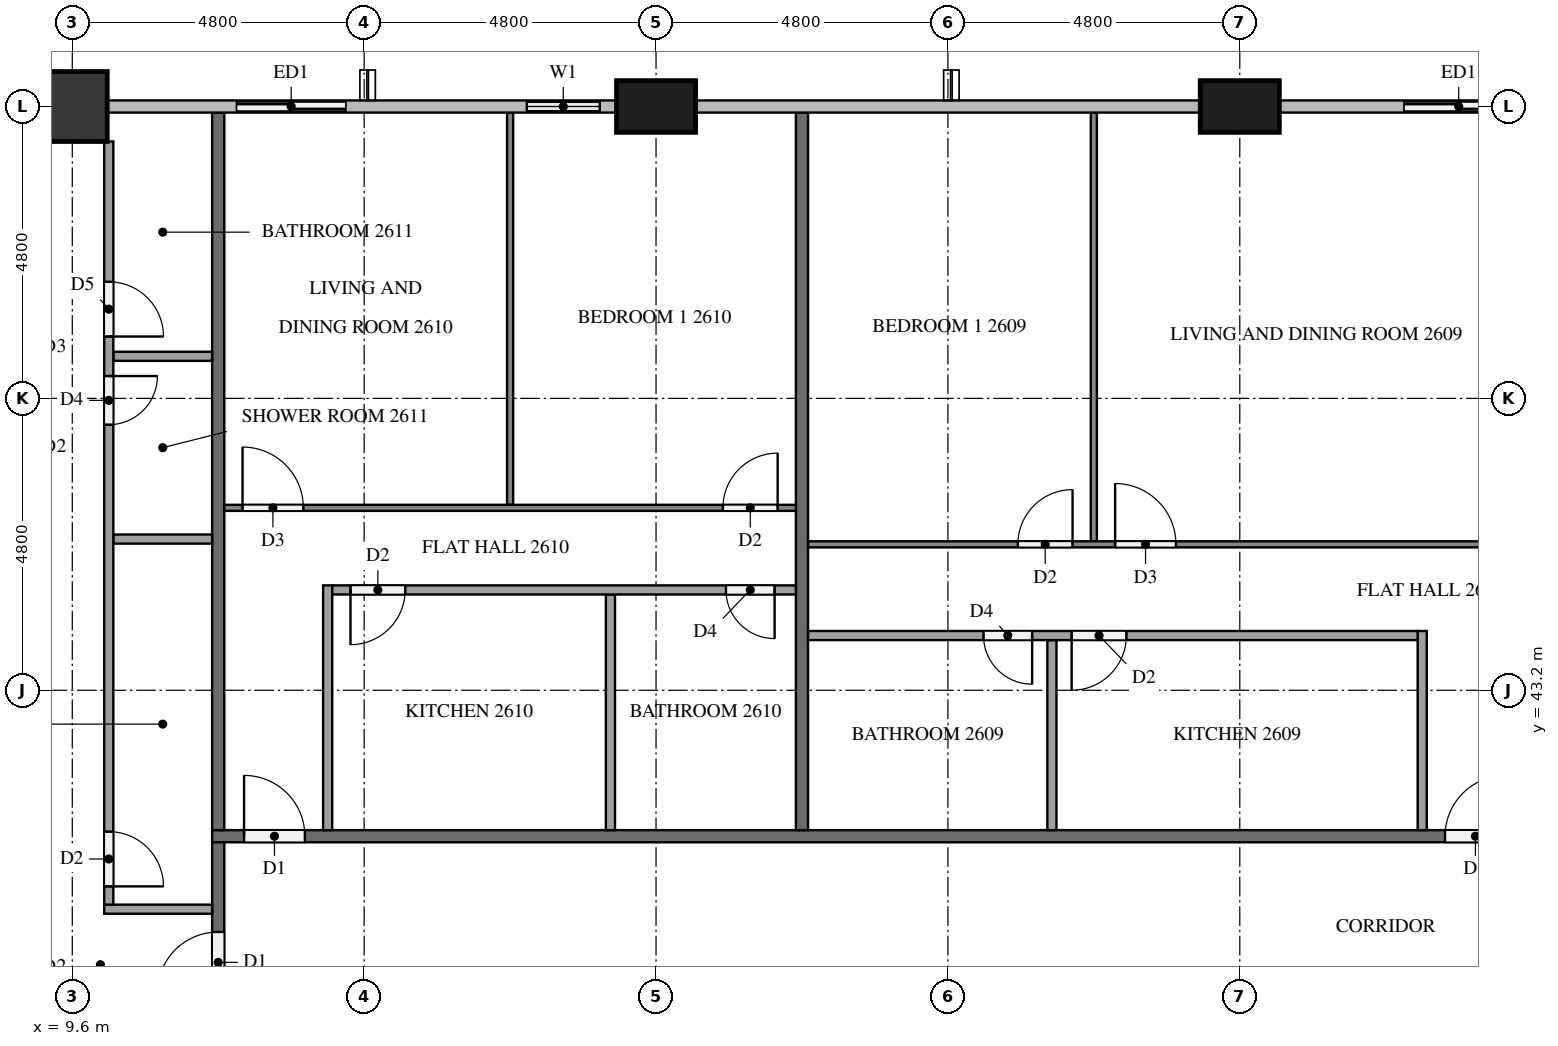
"""IFC4 building model, lengths in metres.
Left out: names, types, materials, properties, quantities, classifications, styles, units other than length and angle.
Written with IfcOpenShell. Run it as: python <this file> out.ifc"""

import sys

from ifc_helpers import new_model, si_unit, direction, frame, frame_2d, origin, origin_2d, place, context, subcontext, project, spatial, rectangle, extrude, element, fill, save


model = new_model("IFC4")
c1 = context("Model", 3, precision=1e-05, world=origin(), true_north=direction((0.0, 1.0)))
c2 = subcontext(c1, "Body", "Model", "MODEL_VIEW")
j1 = project(units=[si_unit("LENGTHUNIT", "METRE"), si_unit("PLANEANGLEUNIT", "RADIAN")], contexts=[c1])
p1 = place(None, origin())
s1 = spatial("IfcSite", under=j1, at=p1, CompositionType="ELEMENT")
p2 = place(p1, origin())
s2 = spatial("IfcBuilding", under=s1, at=p2, CompositionType="ELEMENT")
p3 = place(p2, frame((0.0, 0.0, 103.2)))
s3 = spatial("IfcBuildingStorey", under=s2, at=p3, CompositionType="ELEMENT", Elevation=103.2)
for number, where, z_axis, x_axis in (
    (1, (28.8, 52.8, 0.0), (0.0, 0.0, 1.0), (1.0, 0.0, 0.0)),
    (2, (19.2, 52.8, 0.0), (0.0, 0.0, 1.0), (1.0, 0.0, 0.0)),
):
    element("IfcColumn", number, at=place(p3, frame(where, z_axis=z_axis, x_axis=x_axis)), inside=s3, PredefinedType="COLUMN", context=c2, shape_type="SweptSolid", body=[
        extrude(rectangle(XDim=1.3, YDim=0.85, at=origin_2d()), origin(), (0.0, 0.0, 1.0), 3.2),
    ])
p4 = place(p3, frame((9.6, 52.8, 0.0), z_axis=(0.0, 0.0, 1.0), x_axis=(1.0, 0.0, 0.0)))
e3 = element("IfcColumn", 3, at=p4, inside=s3, PredefinedType="COLUMN", context=c2, shape_type="SweptSolid", body=[
    extrude(rectangle(XDim=1.15, YDim=1.15, at=origin_2d()), origin(), (0.0, 0.0, 1.0), 3.2),
])
p5 = place(p3, frame((33.6, 52.8, 0.0), z_axis=(0.0, 0.0, 1.0), x_axis=(-1.0, 0.0, 0.0)))
e4 = element("IfcWall", 4, at=p5, inside=s3, PredefinedType="SOLIDWALL", context=c2, shape_type="SweptSolid", body=[
    extrude(rectangle(XDim=2.4, YDim=0.15, at=frame_2d((1.2, 0.0))), origin(), (0.0, 0.0, 1.0), 3.2),
])
p6 = place(p5, frame((0.3, 0.0, 0.0)))
e5 = element("IfcOpeningElement", 5, at=p6, cuts=e4, PredefinedType="OPENING", context=c2, shape_type="SweptSolid", body=[
    extrude(rectangle(XDim=1.8, YDim=2.4, at=frame_2d((0.9, 1.2))), frame((0.0, 0.085, 0.0), z_axis=(0.0, -1.0, 0.0), x_axis=(1.0, 0.0, 0.0)), (0.0, 0.0, 1.0), 0.17),
])
p7 = place(p3, frame((18.55, 52.8, 0.0), z_axis=(0.0, 0.0, 1.0), x_axis=(-1.0, 0.0, 0.0)))
e6 = element("IfcWall", 6, at=p7, inside=s3, PredefinedType="SOLIDWALL", context=c2, shape_type="SweptSolid", body=[
    extrude(rectangle(XDim=1.75, YDim=0.15, at=frame_2d((0.875, 0.0))), origin(), (0.0, 0.0, 1.0), 3.2),
])
p8 = place(p7, frame((0.275, 0.0, 0.9)))
e7 = element("IfcOpeningElement", 7, at=p8, cuts=e6, PredefinedType="OPENING", context=c2, shape_type="SweptSolid", body=[
    extrude(rectangle(XDim=1.2, YDim=1.4, at=frame_2d((0.6, 0.7))), frame((0.0, 0.085, 0.0), z_axis=(0.0, -1.0, 0.0), x_axis=(1.0, 0.0, 0.0)), (0.0, 0.0, 1.0), 0.17),
])
p9 = place(p3, frame((14.4, 52.8, 0.0), z_axis=(0.0, 0.0, 1.0), x_axis=(-1.0, 0.0, 0.0)))
e8 = element("IfcWall", 8, at=p9, inside=s3, PredefinedType="SOLIDWALL", context=c2, shape_type="SweptSolid", body=[
    extrude(rectangle(XDim=2.4, YDim=0.15, at=frame_2d((1.2, 0.0))), origin(), (0.0, 0.0, 1.0), 3.2),
])
p10 = place(p9, frame((0.3, 0.0, 0.0)))
e9 = element("IfcOpeningElement", 9, at=p10, cuts=e8, PredefinedType="OPENING", context=c2, shape_type="SweptSolid", body=[
    extrude(rectangle(XDim=1.8, YDim=2.4, at=frame_2d((0.9, 1.2))), frame((0.0, 0.085, 0.0), z_axis=(0.0, -1.0, 0.0), x_axis=(1.0, 0.0, 0.0)), (0.0, 0.0, 1.0), 0.17),
])
p11 = place(p3, frame((11.9, 40.8, 0.0), z_axis=(0.0, 0.0, 1.0), x_axis=(1.0, 0.0, 0.0)))
e10 = element("IfcWall", 10, at=p11, inside=s3, PredefinedType="PARTITIONING", context=c2, shape_type="SweptSolid", body=[
    extrude(rectangle(XDim=38.6, YDim=0.2, at=frame_2d((19.3, 0.0))), origin(), (0.0, 0.0, 1.0), 3.2),
])
p12 = place(p11, frame((22.125, 0.0, 0.0)))
e11 = element("IfcOpeningElement", 11, at=p12, cuts=e10, PredefinedType="OPENING", context=c2, shape_type="SweptSolid", body=[
    extrude(rectangle(XDim=1.0, YDim=2.1, at=frame_2d((0.5, 1.05))), frame((0.0, 0.11, 0.0), z_axis=(0.0, -1.0, 0.0), x_axis=(1.0, 0.0, 0.0)), (0.0, 0.0, 1.0), 0.22),
])
p13 = place(p11, frame((20.275, 0.0, 0.0)))
e12 = element("IfcOpeningElement", 12, at=p13, cuts=e10, PredefinedType="OPENING", context=c2, shape_type="SweptSolid", body=[
    extrude(rectangle(XDim=1.0, YDim=2.1, at=frame_2d((0.5, 1.05))), frame((0.0, 0.11, 0.0), z_axis=(0.0, -1.0, 0.0), x_axis=(1.0, 0.0, 0.0)), (0.0, 0.0, 1.0), 0.22),
])
p14 = place(p11, frame((0.525, 0.0, 0.0)))
e13 = element("IfcOpeningElement", 13, at=p14, cuts=e10, PredefinedType="OPENING", context=c2, shape_type="SweptSolid", body=[
    extrude(rectangle(XDim=1.0, YDim=2.1, at=frame_2d((0.5, 1.05))), frame((0.0, 0.11, 0.0), z_axis=(0.0, -1.0, 0.0), x_axis=(1.0, 0.0, 0.0)), (0.0, 0.0, 1.0), 0.22),
])
p15 = place(p3, frame((12.0, 37.9, 0.0), z_axis=(0.0, 0.0, 1.0), x_axis=(0.0, 1.0, 0.0)))
e14 = element("IfcWall", 14, at=p15, inside=s3, PredefinedType="PARTITIONING", context=c2, shape_type="SweptSolid", body=[
    extrude(rectangle(XDim=2.8, YDim=0.2, at=frame_2d((1.4, 0.0))), origin(), (0.0, 0.0, 1.0), 3.2),
])
p16 = place(p15, frame((0.325, 0.0, 0.0)))
e15 = element("IfcOpeningElement", 15, at=p16, cuts=e14, PredefinedType="OPENING", context=c2, shape_type="SweptSolid", body=[
    extrude(rectangle(XDim=1.0, YDim=2.1, at=frame_2d((0.5, 1.05))), frame((0.0, 0.11, 0.0), z_axis=(0.0, -1.0, 0.0), x_axis=(1.0, 0.0, 0.0)), (0.0, 0.0, 1.0), 0.22),
])
for number, where, z_axis, x_axis in (
    (16, (21.6, 52.7, 0.0), (0.0, 0.0, 1.0), (0.0, -1.0, 0.0)),
    (17, (12.0, 52.7, 0.0), (0.0, 0.0, 1.0), (0.0, -1.0, 0.0)),
):
    element("IfcWall", number, at=place(p3, frame(where, z_axis=z_axis, x_axis=x_axis)), inside=s3, PredefinedType="PARTITIONING", context=c2, shape_type="SweptSolid", body=[
        extrude(rectangle(XDim=11.8, YDim=0.2, at=frame_2d((5.9, 0.0))), origin(), (0.0, 0.0, 1.0), 3.2),
    ])
p17 = place(p3, frame((26.4, 45.65, 0.0), z_axis=(0.0, 0.0, 1.0), x_axis=(0.0, 1.0, 0.0)))
e18 = element("IfcWall", 18, at=p17, inside=s3, PredefinedType="PARTITIONING", context=c2, shape_type="SweptSolid", body=[
    extrude(rectangle(XDim=7.05, YDim=0.1, at=frame_2d((3.525, 0.0))), origin(), (0.0, 0.0, 1.0), 3.2),
])
p18 = place(p3, frame((21.7, 45.6, 0.0), z_axis=(0.0, 0.0, 1.0), x_axis=(1.0, 0.0, 0.0)))
e19 = element("IfcWall", 19, at=p18, inside=s3, PredefinedType="PARTITIONING", context=c2, shape_type="SweptSolid", body=[
    extrude(rectangle(XDim=11.8, YDim=0.1, at=frame_2d((5.9, 0.0))), origin(), (0.0, 0.0, 1.0), 3.2),
])
p19 = place(p18, frame((5.05, 0.0, 0.0)))
e20 = element("IfcOpeningElement", 20, at=p19, cuts=e19, PredefinedType="OPENING", context=c2, shape_type="SweptSolid", body=[
    extrude(rectangle(XDim=1.0, YDim=2.1, at=frame_2d((0.5, 1.05))), frame((0.0, 0.06, 0.0), z_axis=(0.0, -1.0, 0.0), x_axis=(1.0, 0.0, 0.0)), (0.0, 0.0, 1.0), 0.12),
])
p20 = place(p18, frame((3.45, 0.0, 0.0)))
e21 = element("IfcOpeningElement", 21, at=p20, cuts=e19, PredefinedType="OPENING", context=c2, shape_type="SweptSolid", body=[
    extrude(rectangle(XDim=0.9, YDim=2.1, at=frame_2d((0.45, 1.05))), frame((0.0, 0.06, 0.0), z_axis=(0.0, -1.0, 0.0), x_axis=(1.0, 0.0, 0.0)), (0.0, 0.0, 1.0), 0.12),
])
p21 = place(p3, frame((25.71, 40.9, 0.0), z_axis=(0.0, 0.0, 1.0), x_axis=(0.0, 1.0, 0.0)))
e22 = element("IfcWall", 22, at=p21, inside=s3, PredefinedType="PARTITIONING", context=c2, shape_type="SweptSolid", body=[
    extrude(rectangle(XDim=3.125, YDim=0.15, at=frame_2d((1.562, 0.0))), origin(), (0.0, 0.0, 1.0), 3.2),
])
p22 = place(p3, frame((31.8, 40.9, 0.0), z_axis=(0.0, 0.0, 1.0), x_axis=(0.0, 1.0, 0.0)))
e23 = element("IfcWall", 23, at=p22, inside=s3, PredefinedType="PARTITIONING", context=c2, shape_type="SweptSolid", body=[
    extrude(rectangle(XDim=3.275, YDim=0.15, at=frame_2d((1.638, 0.0))), origin(), (0.0, 0.0, 1.0), 3.2),
])
p23 = place(p3, frame((31.725, 44.1, 0.0), z_axis=(0.0, 0.0, 1.0), x_axis=(-1.0, 0.0, 0.0)))
e24 = element("IfcWall", 24, at=p23, inside=s3, PredefinedType="PARTITIONING", context=c2, shape_type="SweptSolid", body=[
    extrude(rectangle(XDim=10.025, YDim=0.15, at=frame_2d((5.013, 0.0))), origin(), (0.0, 0.0, 1.0), 3.2),
])
p24 = place(p23, frame((4.79, 0.0, 0.0)))
e25 = element("IfcOpeningElement", 25, at=p24, cuts=e24, PredefinedType="OPENING", context=c2, shape_type="SweptSolid", body=[
    extrude(rectangle(XDim=0.9, YDim=2.1, at=frame_2d((0.45, 1.05))), frame((0.0, 0.085, 0.0), z_axis=(0.0, -1.0, 0.0), x_axis=(1.0, 0.0, 0.0)), (0.0, 0.0, 1.0), 0.17),
])
p25 = place(p23, frame((6.34, 0.0, 0.0)))
e26 = element("IfcOpeningElement", 26, at=p25, cuts=e24, PredefinedType="OPENING", context=c2, shape_type="SweptSolid", body=[
    extrude(rectangle(XDim=0.8, YDim=2.1, at=frame_2d((0.4, 1.05))), frame((0.0, 0.085, 0.0), z_axis=(0.0, -1.0, 0.0), x_axis=(1.0, 0.0, 0.0)), (0.0, 0.0, 1.0), 0.17),
])
p26 = place(p3, frame((16.8, 46.25, 0.0), z_axis=(0.0, 0.0, 1.0), x_axis=(0.0, 1.0, 0.0)))
e27 = element("IfcWall", 27, at=p26, inside=s3, PredefinedType="PARTITIONING", context=c2, shape_type="SweptSolid", body=[
    extrude(rectangle(XDim=6.45, YDim=0.1, at=frame_2d((3.225, 0.0))), origin(), (0.0, 0.0, 1.0), 3.2),
])
p27 = place(p3, frame((12.1, 46.2, 0.0), z_axis=(0.0, 0.0, 1.0), x_axis=(1.0, 0.0, 0.0)))
e28 = element("IfcWall", 28, at=p27, inside=s3, PredefinedType="PARTITIONING", context=c2, shape_type="SweptSolid", body=[
    extrude(rectangle(XDim=9.4, YDim=0.1, at=frame_2d((4.7, 0.0))), origin(), (0.0, 0.0, 1.0), 3.2),
])
p28 = place(p27, frame((0.3, 0.0, 0.0)))
e29 = element("IfcOpeningElement", 29, at=p28, cuts=e28, PredefinedType="OPENING", context=c2, shape_type="SweptSolid", body=[
    extrude(rectangle(XDim=1.0, YDim=2.1, at=frame_2d((0.5, 1.05))), frame((0.0, 0.06, 0.0), z_axis=(0.0, -1.0, 0.0), x_axis=(1.0, 0.0, 0.0)), (0.0, 0.0, 1.0), 0.12),
])
p29 = place(p27, frame((8.2, 0.0, 0.0)))
e30 = element("IfcOpeningElement", 30, at=p29, cuts=e28, PredefinedType="OPENING", context=c2, shape_type="SweptSolid", body=[
    extrude(rectangle(XDim=0.9, YDim=2.1, at=frame_2d((0.45, 1.05))), frame((0.0, 0.06, 0.0), z_axis=(0.0, -1.0, 0.0), x_axis=(1.0, 0.0, 0.0)), (0.0, 0.0, 1.0), 0.12),
])
p30 = place(p3, frame((18.45, 40.9, 0.0), z_axis=(0.0, 0.0, 1.0), x_axis=(0.0, 1.0, 0.0)))
e31 = element("IfcWall", 31, at=p30, inside=s3, PredefinedType="PARTITIONING", context=c2, shape_type="SweptSolid", body=[
    extrude(rectangle(XDim=3.875, YDim=0.15, at=frame_2d((1.938, 0.0))), origin(), (0.0, 0.0, 1.0), 3.2),
])
p31 = place(p3, frame((13.8, 40.9, 0.0), z_axis=(0.0, 0.0, 1.0), x_axis=(0.0, 1.0, 0.0)))
e32 = element("IfcWall", 32, at=p31, inside=s3, PredefinedType="PARTITIONING", context=c2, shape_type="SweptSolid", body=[
    extrude(rectangle(XDim=4.025, YDim=0.15, at=frame_2d((2.013, 0.0))), origin(), (0.0, 0.0, 1.0), 3.2),
])
p32 = place(p3, frame((21.5, 44.85, 0.0), z_axis=(0.0, 0.0, 1.0), x_axis=(-1.0, 0.0, 0.0)))
e33 = element("IfcWall", 33, at=p32, inside=s3, PredefinedType="PARTITIONING", context=c2, shape_type="SweptSolid", body=[
    extrude(rectangle(XDim=7.625, YDim=0.15, at=frame_2d((3.812, 0.0))), origin(), (0.0, 0.0, 1.0), 3.2),
])
p33 = place(p32, frame((6.425, 0.0, 0.0)))
e34 = element("IfcOpeningElement", 34, at=p33, cuts=e33, PredefinedType="OPENING", context=c2, shape_type="SweptSolid", body=[
    extrude(rectangle(XDim=0.9, YDim=2.1, at=frame_2d((0.45, 1.05))), frame((0.0, 0.085, 0.0), z_axis=(0.0, -1.0, 0.0), x_axis=(1.0, 0.0, 0.0)), (0.0, 0.0, 1.0), 0.17),
])
p34 = place(p32, frame((0.35, 0.0, 0.0)))
e35 = element("IfcOpeningElement", 35, at=p34, cuts=e33, PredefinedType="OPENING", context=c2, shape_type="SweptSolid", body=[
    extrude(rectangle(XDim=0.8, YDim=2.1, at=frame_2d((0.4, 1.05))), frame((0.0, 0.085, 0.0), z_axis=(0.0, -1.0, 0.0), x_axis=(1.0, 0.0, 0.0)), (0.0, 0.0, 1.0), 0.17),
])
for number, where, z_axis, x_axis in (
    (36, (11.9, 45.687, 0.0), (0.0, 0.0, 1.0), (-1.0, 0.0, 0.0)),
    (37, (11.9, 48.692, 0.0), (0.0, 0.0, 1.0), (-1.0, 0.0, 0.0)),
):
    element("IfcWall", number, at=place(p3, frame(where, z_axis=z_axis, x_axis=x_axis)), inside=s3, PredefinedType="PARTITIONING", context=c2, shape_type="SweptSolid", body=[
        extrude(rectangle(XDim=1.625, YDim=0.15, at=frame_2d((0.812, 0.0))), origin(), (0.0, 0.0, 1.0), 3.2),
    ])
p35 = place(p3, frame((11.9, 39.6, 0.0), z_axis=(0.0, 0.0, 1.0), x_axis=(-1.0, 0.0, 0.0)))
e38 = element("IfcWall", 38, at=p35, inside=s3, PredefinedType="PARTITIONING", context=c2, shape_type="SweptSolid", body=[
    extrude(rectangle(XDim=1.775, YDim=0.15, at=frame_2d((0.887, 0.0))), origin(), (0.0, 0.0, 1.0), 3.2),
])
p36 = place(p3, frame((10.2, 52.225, 0.0), z_axis=(0.0, 0.0, 1.0), x_axis=(0.0, -1.0, 0.0)))
e39 = element("IfcWall", 39, at=p36, inside=s3, PredefinedType="PARTITIONING", context=c2, shape_type="SweptSolid", body=[
    extrude(rectangle(XDim=12.55, YDim=0.15, at=frame_2d((6.275, 0.0))), origin(), (0.0, 0.0, 1.0), 3.2),
])
p37 = place(p36, frame((11.35, 0.0, 0.0)))
e40 = element("IfcOpeningElement", 40, at=p37, cuts=e39, PredefinedType="OPENING", context=c2, shape_type="SweptSolid", body=[
    extrude(rectangle(XDim=0.9, YDim=2.1, at=frame_2d((0.45, 1.05))), frame((0.0, 0.085, 0.0), z_axis=(0.0, -1.0, 0.0), x_axis=(1.0, 0.0, 0.0)), (0.0, 0.0, 1.0), 0.17),
])
p38 = place(p36, frame((3.858, 0.0, 0.0)))
e41 = element("IfcOpeningElement", 41, at=p38, cuts=e39, PredefinedType="OPENING", context=c2, shape_type="SweptSolid", body=[
    extrude(rectangle(XDim=0.8, YDim=2.1, at=frame_2d((0.4, 1.05))), frame((0.0, 0.085, 0.0), z_axis=(0.0, -1.0, 0.0), x_axis=(1.0, 0.0, 0.0)), (0.0, 0.0, 1.0), 0.17),
])
p39 = place(p36, frame((2.308, 0.0, 0.0)))
e42 = element("IfcOpeningElement", 42, at=p39, cuts=e39, PredefinedType="OPENING", context=c2, shape_type="SweptSolid", body=[
    extrude(rectangle(XDim=0.9, YDim=2.1, at=frame_2d((0.45, 1.05))), frame((0.0, 0.085, 0.0), z_axis=(0.0, -1.0, 0.0), x_axis=(1.0, 0.0, 0.0)), (0.0, 0.0, 1.0), 0.17),
])
p40 = place(p6, origin())
e43 = element("IfcDoor", 43, at=p40, inside=s3, OperationType="SLIDING_TO_LEFT", PredefinedType="DOOR", context=c2, shape_type="SweptSolid", body=[
    extrude(rectangle(XDim=1.8, YDim=2.4, at=frame_2d((0.9, 1.2))), frame((0.0, 0.025, 0.0), z_axis=(0.0, -1.0, 0.0), x_axis=(1.0, 0.0, 0.0)), (0.0, 0.0, 1.0), 0.05),
])
fill(e5, e43)
p41 = place(p8, origin())
e44 = element("IfcWindow", 44, at=p41, inside=s3, PartitioningType="SINGLE_PANEL", PredefinedType="WINDOW", context=c2, shape_type="SweptSolid", body=[
    extrude(rectangle(XDim=1.2, YDim=1.4, at=frame_2d((0.6, 0.7))), frame((0.0, 0.03, 0.0), z_axis=(0.0, -1.0, 0.0), x_axis=(1.0, 0.0, 0.0)), (0.0, 0.0, 1.0), 0.06),
])
fill(e7, e44)
p42 = place(p10, origin())
e45 = element("IfcDoor", 45, at=p42, inside=s3, OperationType="SLIDING_TO_RIGHT", PredefinedType="DOOR", context=c2, shape_type="SweptSolid", body=[
    extrude(rectangle(XDim=1.8, YDim=2.4, at=frame_2d((0.9, 1.2))), frame((0.0, 0.025, 0.0), z_axis=(0.0, -1.0, 0.0), x_axis=(1.0, 0.0, 0.0)), (0.0, 0.0, 1.0), 0.05),
])
fill(e9, e45)
p43 = place(p13, origin())
e46 = element("IfcDoor", 46, at=p43, inside=s3, OperationType="SINGLE_SWING_RIGHT", PredefinedType="DOOR", context=c2, shape_type="SweptSolid", body=[
    extrude(rectangle(XDim=1.0, YDim=2.1, at=frame_2d((0.5, 1.05))), frame((0.0, 0.025, 0.0), z_axis=(0.0, -1.0, 0.0), x_axis=(1.0, 0.0, 0.0)), (0.0, 0.0, 1.0), 0.05),
])
fill(e12, e46)
p44 = place(p14, origin())
e47 = element("IfcDoor", 47, at=p44, inside=s3, OperationType="SINGLE_SWING_LEFT", PredefinedType="DOOR", context=c2, shape_type="SweptSolid", body=[
    extrude(rectangle(XDim=1.0, YDim=2.1, at=frame_2d((0.5, 1.05))), frame((0.0, 0.025, 0.0), z_axis=(0.0, -1.0, 0.0), x_axis=(1.0, 0.0, 0.0)), (0.0, 0.0, 1.0), 0.05),
])
fill(e13, e47)
p45 = place(p16, origin())
e48 = element("IfcDoor", 48, at=p45, inside=s3, OperationType="SINGLE_SWING_LEFT", PredefinedType="DOOR", context=c2, shape_type="SweptSolid", body=[
    extrude(rectangle(XDim=1.0, YDim=2.1, at=frame_2d((0.5, 1.05))), frame((0.0, 0.025, 0.0), z_axis=(0.0, -1.0, 0.0), x_axis=(1.0, 0.0, 0.0)), (0.0, 0.0, 1.0), 0.05),
])
fill(e15, e48)
p46 = place(p19, origin())
e49 = element("IfcDoor", 49, at=p46, inside=s3, OperationType="SINGLE_SWING_LEFT", PredefinedType="DOOR", context=c2, shape_type="SweptSolid", body=[
    extrude(rectangle(XDim=1.0, YDim=2.1, at=frame_2d((0.5, 1.05))), frame((0.0, 0.025, 0.0), z_axis=(0.0, -1.0, 0.0), x_axis=(1.0, 0.0, 0.0)), (0.0, 0.0, 1.0), 0.05),
])
fill(e20, e49)
p47 = place(p20, origin())
e50 = element("IfcDoor", 50, at=p47, inside=s3, OperationType="SINGLE_SWING_RIGHT", PredefinedType="DOOR", context=c2, shape_type="SweptSolid", body=[
    extrude(rectangle(XDim=0.9, YDim=2.1, at=frame_2d((0.45, 1.05))), frame((0.0, 0.025, 0.0), z_axis=(0.0, -1.0, 0.0), x_axis=(1.0, 0.0, 0.0)), (0.0, 0.0, 1.0), 0.05),
])
fill(e21, e50)
p48 = place(p24, origin())
e51 = element("IfcDoor", 51, at=p48, inside=s3, OperationType="SINGLE_SWING_RIGHT", PredefinedType="DOOR", context=c2, shape_type="SweptSolid", body=[
    extrude(rectangle(XDim=0.9, YDim=2.1, at=frame_2d((0.45, 1.05))), frame((0.0, 0.025, 0.0), z_axis=(0.0, -1.0, 0.0), x_axis=(1.0, 0.0, 0.0)), (0.0, 0.0, 1.0), 0.05),
])
fill(e25, e51)
p49 = place(p25, origin())
e52 = element("IfcDoor", 52, at=p49, inside=s3, OperationType="SINGLE_SWING_LEFT", PredefinedType="DOOR", context=c2, shape_type="SweptSolid", body=[
    extrude(rectangle(XDim=0.8, YDim=2.1, at=frame_2d((0.4, 1.05))), frame((0.0, 0.025, 0.0), z_axis=(0.0, -1.0, 0.0), x_axis=(1.0, 0.0, 0.0)), (0.0, 0.0, 1.0), 0.05),
])
fill(e26, e52)
p50 = place(p28, origin())
e53 = element("IfcDoor", 53, at=p50, inside=s3, OperationType="SINGLE_SWING_LEFT", PredefinedType="DOOR", context=c2, shape_type="SweptSolid", body=[
    extrude(rectangle(XDim=1.0, YDim=2.1, at=frame_2d((0.5, 1.05))), frame((0.0, 0.025, 0.0), z_axis=(0.0, -1.0, 0.0), x_axis=(1.0, 0.0, 0.0)), (0.0, 0.0, 1.0), 0.05),
])
fill(e29, e53)
p51 = place(p29, origin())
e54 = element("IfcDoor", 54, at=p51, inside=s3, OperationType="SINGLE_SWING_RIGHT", PredefinedType="DOOR", context=c2, shape_type="SweptSolid", body=[
    extrude(rectangle(XDim=0.9, YDim=2.1, at=frame_2d((0.45, 1.05))), frame((0.0, 0.025, 0.0), z_axis=(0.0, -1.0, 0.0), x_axis=(1.0, 0.0, 0.0)), (0.0, 0.0, 1.0), 0.05),
])
fill(e30, e54)
p52 = place(p33, origin())
e55 = element("IfcDoor", 55, at=p52, inside=s3, OperationType="SINGLE_SWING_RIGHT", PredefinedType="DOOR", context=c2, shape_type="SweptSolid", body=[
    extrude(rectangle(XDim=0.9, YDim=2.1, at=frame_2d((0.45, 1.05))), frame((0.0, 0.025, 0.0), z_axis=(0.0, -1.0, 0.0), x_axis=(1.0, 0.0, 0.0)), (0.0, 0.0, 1.0), 0.05),
])
fill(e34, e55)
p53 = place(p34, origin())
e56 = element("IfcDoor", 56, at=p53, inside=s3, OperationType="SINGLE_SWING_LEFT", PredefinedType="DOOR", context=c2, shape_type="SweptSolid", body=[
    extrude(rectangle(XDim=0.8, YDim=2.1, at=frame_2d((0.4, 1.05))), frame((0.0, 0.025, 0.0), z_axis=(0.0, -1.0, 0.0), x_axis=(1.0, 0.0, 0.0)), (0.0, 0.0, 1.0), 0.05),
])
fill(e35, e56)
p54 = place(p37, origin())
e57 = element("IfcDoor", 57, at=p54, inside=s3, OperationType="SINGLE_SWING_RIGHT", PredefinedType="DOOR", context=c2, shape_type="SweptSolid", body=[
    extrude(rectangle(XDim=0.9, YDim=2.1, at=frame_2d((0.45, 1.05))), frame((0.0, 0.025, 0.0), z_axis=(0.0, -1.0, 0.0), x_axis=(1.0, 0.0, 0.0)), (0.0, 0.0, 1.0), 0.05),
])
fill(e40, e57)
p55 = place(p38, origin())
e58 = element("IfcDoor", 58, at=p55, inside=s3, OperationType="SINGLE_SWING_LEFT", PredefinedType="DOOR", context=c2, shape_type="SweptSolid", body=[
    extrude(rectangle(XDim=0.8, YDim=2.1, at=frame_2d((0.4, 1.05))), frame((0.0, 0.025, 0.0), z_axis=(0.0, -1.0, 0.0), x_axis=(1.0, 0.0, 0.0)), (0.0, 0.0, 1.0), 0.05),
])
fill(e41, e58)
p56 = place(p39, origin())
e59 = element("IfcDoor", 59, at=p56, inside=s3, OperationType="SINGLE_SWING_RIGHT", PredefinedType="DOOR", context=c2, shape_type="SweptSolid", body=[
    extrude(rectangle(XDim=0.9, YDim=2.1, at=frame_2d((0.45, 1.05))), frame((0.0, 0.025, 0.0), z_axis=(0.0, -1.0, 0.0), x_axis=(1.0, 0.0, 0.0)), (0.0, 0.0, 1.0), 0.05),
])
fill(e42, e59)
save(model, sys.argv[1])
